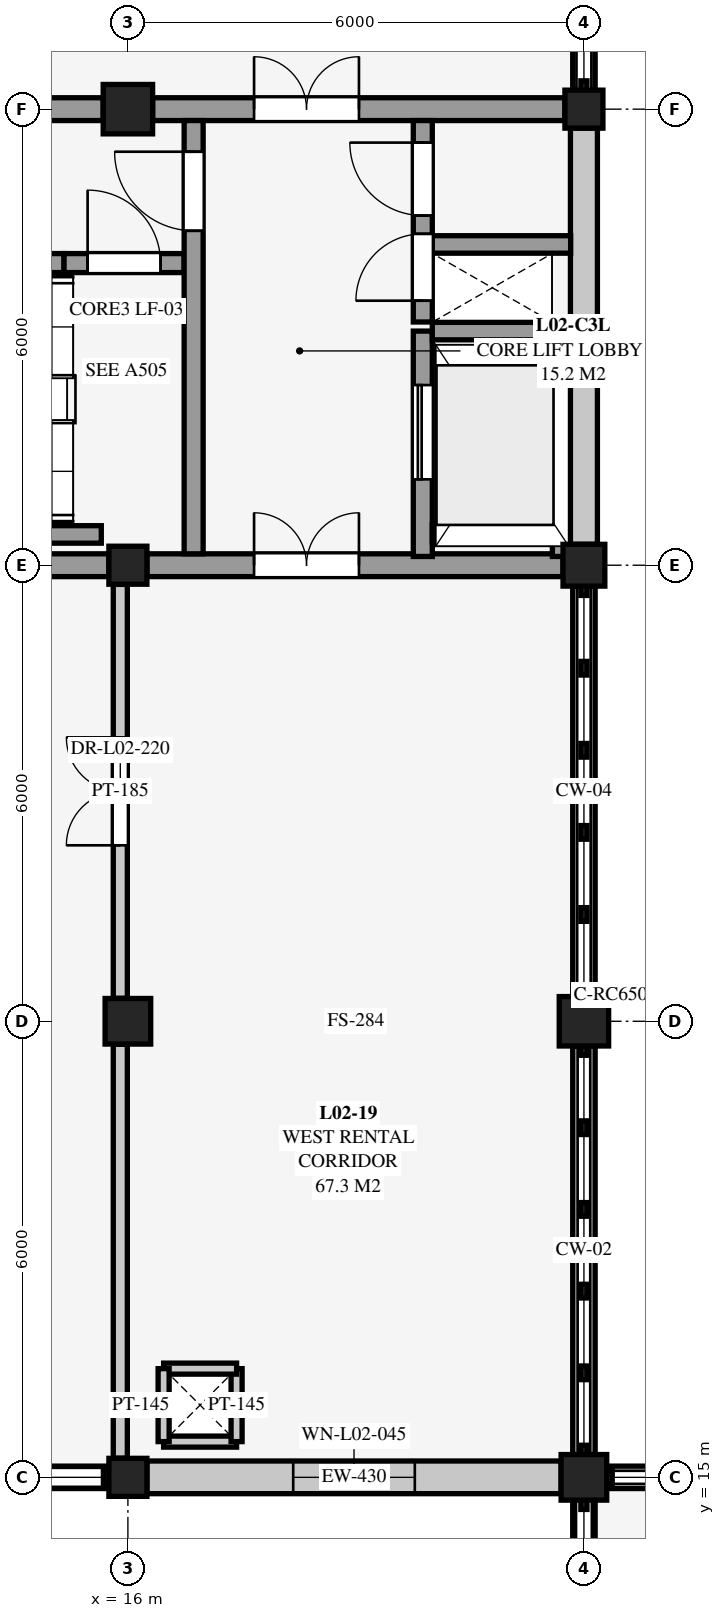
"""IFC4 building model, lengths in metres.
Left out: names, types, materials, properties, quantities, classifications, styles, units other than length and angle.
Written with IfcOpenShell. Run it as: python <this file> out.ifc"""

import sys

from ifc_helpers import new_model, si_unit, direction, frame, frame_2d, origin, origin_2d, place, context, subcontext, project, spatial, rectangle, extrude, element, fill, save


model = new_model("IFC4")
c1 = context("Model", 3, precision=1e-05, world=origin(), true_north=direction((0.0, 1.0)))
c2 = subcontext(c1, "Body", "Model", "MODEL_VIEW")
j1 = project(units=[si_unit("LENGTHUNIT", "METRE"), si_unit("PLANEANGLEUNIT", "RADIAN")], contexts=[c1])
p1 = place(None, origin())
s1 = spatial("IfcSite", under=j1, at=p1, CompositionType="ELEMENT")
p2 = place(p1, origin())
s2 = spatial("IfcBuilding", under=s1, at=p2, CompositionType="ELEMENT")
p3 = place(p2, frame((0.0, 0.0, 4.5)))
s3 = spatial("IfcBuildingStorey", under=s2, at=p3, CompositionType="ELEMENT", Elevation=4.5)
p4 = place(p3, frame((16.0, 15.0, 0.0), z_axis=(0.0, 0.0, 1.0), x_axis=(1.0, 0.0, 0.0)))
e1 = element("IfcColumn", 1, at=p4, inside=s3, PredefinedType="COLUMN", context=c2, shape_type="SweptSolid", body=[
    extrude(rectangle(XDim=0.5, YDim=0.5, at=origin_2d()), origin(), (0.0, 0.0, 1.0), 4.5),
])
p5 = place(p3, frame((16.0, 21.0, 0.0), z_axis=(0.0, 0.0, 1.0), x_axis=(1.0, 0.0, 0.0)))
e2 = element("IfcColumn", 2, at=p5, inside=s3, PredefinedType="COLUMN", context=c2, shape_type="SweptSolid", body=[
    extrude(rectangle(XDim=0.6, YDim=0.6, at=origin_2d()), origin(), (0.0, 0.0, 1.0), 4.5),
])
p6 = place(p3, frame((16.0, 27.0, 0.0), z_axis=(0.0, 0.0, 1.0), x_axis=(1.0, 0.0, 0.0)))
e3 = element("IfcColumn", 3, at=p6, inside=s3, PredefinedType="COLUMN", context=c2, shape_type="SweptSolid", body=[
    extrude(rectangle(XDim=0.5, YDim=0.5, at=origin_2d()), origin(), (0.0, 0.0, 1.0), 4.5),
])
p7 = place(p3, frame((16.0, 33.0, 0.0), z_axis=(0.0, 0.0, 1.0), x_axis=(1.0, 0.0, 0.0)))
e4 = element("IfcColumn", 4, at=p7, inside=s3, PredefinedType="COLUMN", context=c2, shape_type="SweptSolid", body=[
    extrude(rectangle(XDim=0.65, YDim=0.65, at=origin_2d()), origin(), (0.0, 0.0, 1.0), 4.5),
])
p8 = place(p3, frame((22.0, 15.0, 0.0), z_axis=(0.0, 0.0, 1.0), x_axis=(1.0, 0.0, 0.0)))
e5 = element("IfcColumn", 5, at=p8, inside=s3, PredefinedType="COLUMN", context=c2, shape_type="SweptSolid", body=[
    extrude(rectangle(XDim=0.6, YDim=0.6, at=origin_2d()), origin(), (0.0, 0.0, 1.0), 4.5),
])
p9 = place(p3, frame((22.0, 21.0, 0.0), z_axis=(0.0, 0.0, 1.0), x_axis=(1.0, 0.0, 0.0)))
e6 = element("IfcColumn", 6, at=p9, inside=s3, PredefinedType="COLUMN", context=c2, shape_type="SweptSolid", body=[
    extrude(rectangle(XDim=0.65, YDim=0.65, at=origin_2d()), origin(), (0.0, 0.0, 1.0), 4.5),
])
p10 = place(p3, frame((22.0, 27.0, 0.0), z_axis=(0.0, 0.0, 1.0), x_axis=(1.0, 0.0, 0.0)))
e7 = element("IfcColumn", 7, at=p10, inside=s3, PredefinedType="COLUMN", context=c2, shape_type="SweptSolid", body=[
    extrude(rectangle(XDim=0.55, YDim=0.55, at=origin_2d()), origin(), (0.0, 0.0, 1.0), 4.5),
])
p11 = place(p3, frame((22.0, 33.0, 0.0), z_axis=(0.0, 0.0, 1.0), x_axis=(1.0, 0.0, 0.0)))
e8 = element("IfcColumn", 8, at=p11, inside=s3, PredefinedType="COLUMN", context=c2, shape_type="SweptSolid", body=[
    extrude(rectangle(XDim=0.5, YDim=0.5, at=origin_2d()), origin(), (0.0, 0.0, 1.0), 4.5),
])
p12 = place(p3, frame((22.3, 15.0, 0.0), z_axis=(0.0, 0.0, 1.0), x_axis=(1.0, 0.0, 0.0)))
e9 = element("IfcWall", 9, at=p12, inside=s3, PredefinedType="SOLIDWALL", context=c2, shape_type="SweptSolid", body=[
    extrude(rectangle(XDim=5.425, YDim=0.295, at=frame_2d((2.712, 0.0))), origin(), (0.0, 0.0, 1.0), 0.26),
])
p13 = place(p3, frame((22.0, 9.775, 0.0), z_axis=(0.0, 0.0, 1.0), x_axis=(0.0, 1.0, 0.0)))
e10 = element("IfcWall", 10, at=p13, inside=s3, PredefinedType="SOLIDWALL", context=c2, shape_type="SweptSolid", body=[
    extrude(rectangle(XDim=4.925, YDim=0.295, at=frame_2d((2.462, 0.0))), origin(), (0.0, 0.0, 1.0), 0.16),
])
p14 = place(p3, frame((15.75, 15.0, 0.0), z_axis=(0.0, 0.0, 1.0), x_axis=(-1.0, 0.0, 0.0)))
e11 = element("IfcWall", 11, at=p14, inside=s3, PredefinedType="SOLIDWALL", context=c2, shape_type="SweptSolid", body=[
    extrude(rectangle(XDim=5.5, YDim=0.295, at=frame_2d((2.75, 0.0))), origin(), (0.0, 0.0, 1.0), 0.52),
])
p15 = place(p3, frame((21.7, 15.0, 0.0), z_axis=(0.0, 0.0, 1.0), x_axis=(-1.0, 0.0, 0.0)))
e12 = element("IfcWall", 12, at=p15, inside=s3, PredefinedType="SOLIDWALL", context=c2, shape_type="SweptSolid", body=[
    extrude(rectangle(XDim=5.45, YDim=0.43, at=frame_2d((2.725, 0.0))), origin(), (0.0, 0.0, 1.0), 3.809),
])
p16 = place(p15, frame((1.925, 0.0, 1.25)))
e13 = element("IfcOpeningElement", 13, at=p16, cuts=e12, PredefinedType="OPENING", context=c2, shape_type="SweptSolid", body=[
    extrude(rectangle(XDim=1.6, YDim=1.5, at=frame_2d((0.8, 0.75))), frame((0.0, 0.225, 0.0), z_axis=(0.0, -1.0, 0.0), x_axis=(1.0, 0.0, 0.0)), (0.0, 0.0, 1.0), 0.45),
])
p17 = place(p3, frame((22.0, 20.675, 0.0), z_axis=(0.0, 0.0, 1.0), x_axis=(0.0, -1.0, 0.0)))
e14 = element("IfcWall", 14, at=p17, inside=s3, PredefinedType="SOLIDWALL", context=c2, shape_type="SweptSolid", body=[
    extrude(rectangle(XDim=5.375, YDim=0.295, at=frame_2d((2.688, 0.0))), origin(), (0.0, 0.0, 1.0), 0.21),
])
p18 = place(p3, frame((22.0, 26.725, 0.0), z_axis=(0.0, 0.0, 1.0), x_axis=(0.0, -1.0, 0.0)))
e15 = element("IfcWall", 15, at=p18, inside=s3, PredefinedType="SOLIDWALL", context=c2, shape_type="SweptSolid", body=[
    extrude(rectangle(XDim=5.4, YDim=0.295, at=frame_2d((2.7, 0.0))), origin(), (0.0, 0.0, 1.0), 0.31),
])
p19 = place(p3, frame((22.0, 32.75, 0.0), z_axis=(0.0, 0.0, 1.0), x_axis=(0.0, -1.0, 0.0)))
e16 = element("IfcWall", 16, at=p19, inside=s3, PredefinedType="SOLIDWALL", context=c2, shape_type="SweptSolid", body=[
    extrude(rectangle(XDim=5.475, YDim=0.355, at=frame_2d((2.738, 0.0))), origin(), (0.0, 0.0, 1.0), 3.778),
])
p20 = place(p3, frame((22.0, 38.675, 0.0), z_axis=(0.0, 0.0, 1.0), x_axis=(0.0, -1.0, 0.0)))
e17 = element("IfcWall", 17, at=p20, inside=s3, PredefinedType="SOLIDWALL", context=c2, shape_type="SweptSolid", body=[
    extrude(rectangle(XDim=5.425, YDim=0.295, at=frame_2d((2.712, 0.0))), origin(), (0.0, 0.0, 1.0), 0.46),
])
for number, where, z_axis, x_axis in (
    (18, (16.47, 15.47, 0.0), (0.0, 0.0, 1.0), (1.0, 0.0, 0.0)),
    (19, (17.43, 15.47, 0.0), (0.0, 0.0, 1.0), (0.0, 1.0, 0.0)),
    (20, (17.43, 16.43, 0.0), (0.0, 0.0, 1.0), (-1.0, 0.0, 0.0)),
    (21, (16.47, 16.43, 0.0), (0.0, 0.0, 1.0), (0.0, -1.0, 0.0)),
):
    element("IfcWall", number, at=place(p3, frame(where, z_axis=z_axis, x_axis=x_axis)), inside=s3, PredefinedType="PARTITIONING", context=c2, shape_type="SweptSolid", body=[
        extrude(rectangle(XDim=0.96, YDim=0.145, at=frame_2d((0.48, 0.0))), origin(), (0.0, 0.0, 1.0), 4.24),
    ])
p21 = place(p3, frame((10.25, 27.0, 0.0), z_axis=(0.0, 0.0, 1.0), x_axis=(1.0, 0.0, 0.0)))
e22 = element("IfcWall", 22, at=p21, inside=s3, PredefinedType="SHEAR", context=c2, shape_type="SweptSolid", body=[
    extrude(rectangle(XDim=5.5, YDim=0.3, at=frame_2d((2.75, 0.0))), origin(), (0.0, 0.0, 1.0), 4.185),
])
p22 = place(p3, frame((16.25, 27.0, 0.0), z_axis=(0.0, 0.0, 1.0), x_axis=(1.0, 0.0, 0.0)))
e23 = element("IfcWall", 23, at=p22, inside=s3, PredefinedType="SHEAR", context=c2, shape_type="SweptSolid", body=[
    extrude(rectangle(XDim=5.475, YDim=0.3, at=frame_2d((2.738, 0.0))), origin(), (0.0, 0.0, 1.0), 4.185),
])
p23 = place(p22, frame((1.41, 0.0, 0.0)))
e24 = element("IfcOpeningElement", 24, at=p23, cuts=e23, PredefinedType="OPENING", context=c2, shape_type="SweptSolid", body=[
    extrude(rectangle(XDim=1.38, YDim=2.16, at=frame_2d((0.69, 1.08))), frame((0.0, 0.16, 0.0), z_axis=(0.0, -1.0, 0.0), x_axis=(1.0, 0.0, 0.0)), (0.0, 0.0, 1.0), 0.32),
])
p24 = place(p3, frame((10.325, 33.0, 0.0), z_axis=(0.0, 0.0, 1.0), x_axis=(1.0, 0.0, 0.0)))
e25 = element("IfcWall", 25, at=p24, inside=s3, PredefinedType="SHEAR", context=c2, shape_type="SweptSolid", body=[
    extrude(rectangle(XDim=5.35, YDim=0.3, at=frame_2d((2.675, 0.0))), origin(), (0.0, 0.0, 1.0), 4.185),
])
p25 = place(p24, frame((3.305, 0.0, 0.0)))
e26 = element("IfcOpeningElement", 26, at=p25, cuts=e25, PredefinedType="OPENING", context=c2, shape_type="SweptSolid", body=[
    extrude(rectangle(XDim=1.04, YDim=2.14, at=frame_2d((0.52, 1.07))), frame((0.0, 0.16, 0.0), z_axis=(0.0, -1.0, 0.0), x_axis=(1.0, 0.0, 0.0)), (0.0, 0.0, 1.0), 0.32),
])
p26 = place(p3, frame((16.325, 33.0, 0.0), z_axis=(0.0, 0.0, 1.0), x_axis=(1.0, 0.0, 0.0)))
e27 = element("IfcWall", 27, at=p26, inside=s3, PredefinedType="SHEAR", context=c2, shape_type="SweptSolid", body=[
    extrude(rectangle(XDim=5.425, YDim=0.3, at=frame_2d((2.712, 0.0))), origin(), (0.0, 0.0, 1.0), 4.185),
])
p27 = place(p26, frame((1.335, 0.0, 0.0)))
e28 = element("IfcOpeningElement", 28, at=p27, cuts=e27, PredefinedType="OPENING", context=c2, shape_type="SweptSolid", body=[
    extrude(rectangle(XDim=1.38, YDim=2.16, at=frame_2d((0.69, 1.08))), frame((0.0, 0.16, 0.0), z_axis=(0.0, -1.0, 0.0), x_axis=(1.0, 0.0, 0.0)), (0.0, 0.0, 1.0), 0.32),
])
p28 = place(p3, frame((10.52, 27.405, 0.0), z_axis=(0.0, 0.0, 1.0), x_axis=(1.0, 0.0, 0.0)))
e29 = element("IfcWall", 29, at=p28, inside=s3, PredefinedType="SHEAR", context=c2, shape_type="SweptSolid", body=[
    extrude(rectangle(XDim=5.13, YDim=0.23, at=frame_2d((2.565, 0.0))), origin(), (0.0, 0.0, 1.0), 4.5),
])
p29 = place(p3, frame((10.29, 30.975, 0.0), z_axis=(0.0, 0.0, 1.0), x_axis=(1.0, 0.0, 0.0)))
e30 = element("IfcWall", 30, at=p29, inside=s3, PredefinedType="SHEAR", context=c2, shape_type="SweptSolid", body=[
    extrude(rectangle(XDim=4.87, YDim=0.25, at=frame_2d((2.435, 0.0))), origin(), (0.0, 0.0, 1.0), 4.5),
])
p30 = place(p3, frame((15.16, 30.975, 0.0), z_axis=(0.0, 0.0, 1.0), x_axis=(1.0, 0.0, 0.0)))
e31 = element("IfcWall", 31, at=p30, inside=s3, PredefinedType="SHEAR", context=c2, shape_type="SweptSolid", body=[
    extrude(rectangle(XDim=1.58, YDim=0.25, at=frame_2d((0.79, 0.0))), origin(), (0.0, 0.0, 1.0), 4.185),
])
p31 = place(p30, frame((0.31, 0.0, 0.0)))
e32 = element("IfcOpeningElement", 32, at=p31, cuts=e31, PredefinedType="OPENING", context=c2, shape_type="SweptSolid", body=[
    extrude(rectangle(XDim=0.96, YDim=2.12, at=frame_2d((0.48, 1.06))), frame((0.0, 0.135, 0.0), z_axis=(0.0, -1.0, 0.0), x_axis=(1.0, 0.0, 0.0)), (0.0, 0.0, 1.0), 0.27),
])
p32 = place(p3, frame((16.865, 27.15, 0.0), z_axis=(0.0, 0.0, 1.0), x_axis=(0.0, 1.0, 0.0)))
e33 = element("IfcWall", 33, at=p32, inside=s3, PredefinedType="SHEAR", context=c2, shape_type="SweptSolid", body=[
    extrude(rectangle(XDim=5.7, YDim=0.25, at=frame_2d((2.85, 0.0))), origin(), (0.0, 0.0, 1.0), 4.185),
])
p33 = place(p32, frame((4.25, 0.0, 0.0)))
e34 = element("IfcOpeningElement", 34, at=p33, cuts=e33, PredefinedType="OPENING", context=c2, shape_type="SweptSolid", body=[
    extrude(rectangle(XDim=1.04, YDim=2.14, at=frame_2d((0.52, 1.07))), frame((0.0, 0.135, 0.0), z_axis=(0.0, -1.0, 0.0), x_axis=(1.0, 0.0, 0.0)), (0.0, 0.0, 1.0), 0.27),
])
p34 = place(p3, frame((19.88, 27.115, 0.0), z_axis=(0.0, 0.0, 1.0), x_axis=(0.0, 1.0, 0.0)))
e35 = element("IfcWall", 35, at=p34, inside=s3, PredefinedType="SHEAR", context=c2, shape_type="SweptSolid", body=[
    extrude(rectangle(XDim=2.965, YDim=0.25, at=frame_2d((1.482, 0.0))), origin(), (0.0, 0.0, 1.0), 4.5),
])
p35 = place(p34, frame((1.015, 0.0, 0.0)))
e36 = element("IfcOpeningElement", 36, at=p35, cuts=e35, PredefinedType="OPENING", context=c2, shape_type="SweptSolid", body=[
    extrude(rectangle(XDim=1.24, YDim=2.2, at=frame_2d((0.62, 1.1))), frame((0.0, 0.135, 0.0), z_axis=(0.0, -1.0, 0.0), x_axis=(1.0, 0.0, 0.0)), (0.0, 0.0, 1.0), 0.27),
])
p36 = place(p3, frame((20.005, 27.42, 0.0), z_axis=(0.0, 0.0, 1.0), x_axis=(1.0, 0.0, 0.0)))
e37 = element("IfcWall", 37, at=p36, inside=s3, PredefinedType="SHEAR", context=c2, shape_type="SweptSolid", body=[
    extrude(rectangle(XDim=1.58, YDim=0.23, at=frame_2d((0.79, 0.0))), origin(), (0.0, 0.0, 1.0), 4.5),
])
p37 = place(p3, frame((21.7, 27.115, 0.0), z_axis=(0.0, 0.0, 1.0), x_axis=(0.0, 1.0, 0.0)))
e38 = element("IfcWall", 38, at=p37, inside=s3, PredefinedType="SHEAR", context=c2, shape_type="SweptSolid", body=[
    extrude(rectangle(XDim=2.965, YDim=0.23, at=frame_2d((1.482, 0.0))), origin(), (0.0, 0.0, 1.0), 4.5),
])
p38 = place(p3, frame((20.005, 30.08, 0.0), z_axis=(0.0, 0.0, 1.0), x_axis=(1.0, 0.0, 0.0)))
e39 = element("IfcWall", 39, at=p38, inside=s3, PredefinedType="SHEAR", context=c2, shape_type="SweptSolid", body=[
    extrude(rectangle(XDim=1.58, YDim=0.23, at=frame_2d((0.79, 0.0))), origin(), (0.0, 0.0, 1.0), 4.5),
])
p39 = place(p3, frame((19.88, 30.2, 0.0), z_axis=(0.0, 0.0, 1.0), x_axis=(0.0, 1.0, 0.0)))
e40 = element("IfcWall", 40, at=p39, inside=s3, PredefinedType="SHEAR", context=c2, shape_type="SweptSolid", body=[
    extrude(rectangle(XDim=2.65, YDim=0.25, at=frame_2d((1.325, 0.0))), origin(), (0.0, 0.0, 1.0), 4.185),
])
p40 = place(p39, frame((0.28, 0.0, 0.0)))
e41 = element("IfcOpeningElement", 41, at=p40, cuts=e40, PredefinedType="OPENING", context=c2, shape_type="SweptSolid", body=[
    extrude(rectangle(XDim=0.88, YDim=2.08, at=frame_2d((0.44, 1.04))), frame((0.0, 0.135, 0.0), z_axis=(0.0, -1.0, 0.0), x_axis=(1.0, 0.0, 0.0)), (0.0, 0.0, 1.0), 0.27),
])
p41 = place(p39, frame((1.4, 0.0, 0.0)))
e42 = element("IfcOpeningElement", 42, at=p41, cuts=e40, PredefinedType="OPENING", context=c2, shape_type="SweptSolid", body=[
    extrude(rectangle(XDim=0.96, YDim=2.12, at=frame_2d((0.48, 1.06))), frame((0.0, 0.135, 0.0), z_axis=(0.0, -1.0, 0.0), x_axis=(1.0, 0.0, 0.0)), (0.0, 0.0, 1.0), 0.27),
])
p42 = place(p3, frame((20.005, 31.22, 0.0), z_axis=(0.0, 0.0, 1.0), x_axis=(1.0, 0.0, 0.0)))
e43 = element("IfcWall", 43, at=p42, inside=s3, PredefinedType="SHEAR", context=c2, shape_type="SweptSolid", body=[
    extrude(rectangle(XDim=1.82, YDim=0.23, at=frame_2d((0.91, 0.0))), origin(), (0.0, 0.0, 1.0), 4.185),
])
p43 = place(p3, frame((15.9, 21.302, 0.0), z_axis=(0.0, 0.0, 1.0), x_axis=(0.0, 1.0, 0.0)))
e44 = element("IfcWall", 44, at=p43, inside=s3, PredefinedType="PARTITIONING", context=c2, shape_type="SweptSolid", body=[
    extrude(rectangle(XDim=5.446, YDim=0.185, at=frame_2d((2.723, 0.0))), origin(), (0.0, 0.0, 1.0), 3.831),
])
p44 = place(p43, frame((2.013, 0.0, 0.0)))
e45 = element("IfcOpeningElement", 45, at=p44, cuts=e44, PredefinedType="OPENING", context=c2, shape_type="SweptSolid", body=[
    extrude(rectangle(XDim=1.42, YDim=2.24, at=frame_2d((0.71, 1.12))), frame((0.0, 0.103, 0.0), z_axis=(0.0, -1.0, 0.0), x_axis=(1.0, 0.0, 0.0)), (0.0, 0.0, 1.0), 0.205),
])
p45 = place(p3, frame((15.9, 15.252, 0.0), z_axis=(0.0, 0.0, 1.0), x_axis=(0.0, 1.0, 0.0)))
e46 = element("IfcWall", 46, at=p45, inside=s3, PredefinedType="PARTITIONING", context=c2, shape_type="SweptSolid", body=[
    extrude(rectangle(XDim=5.446, YDim=0.185, at=frame_2d((2.723, 0.0))), origin(), (0.0, 0.0, 1.0), 4.24),
])
p46 = place(p16, origin())
e47 = element("IfcWindow", 47, at=p46, inside=s3, PartitioningType="SINGLE_PANEL", PredefinedType="WINDOW", context=c2, shape_type="SweptSolid", body=[
    extrude(rectangle(XDim=1.6, YDim=1.5, at=frame_2d((0.8, 0.75))), frame((0.0, 0.03, 0.0), z_axis=(0.0, -1.0, 0.0), x_axis=(1.0, 0.0, 0.0)), (0.0, 0.0, 1.0), 0.06),
])
fill(e13, e47)
p47 = place(p23, origin())
e48 = element("IfcDoor", 48, at=p47, inside=s3, OperationType="DOUBLE_DOOR_SINGLE_SWING", PredefinedType="DOOR", context=c2, shape_type="SweptSolid", body=[
    extrude(rectangle(XDim=1.38, YDim=2.16, at=frame_2d((0.69, 1.08))), frame((0.0, 0.025, 0.0), z_axis=(0.0, -1.0, 0.0), x_axis=(1.0, 0.0, 0.0)), (0.0, 0.0, 1.0), 0.05),
])
fill(e24, e48)
p48 = place(p27, origin())
e49 = element("IfcDoor", 49, at=p48, inside=s3, OperationType="DOUBLE_DOOR_SINGLE_SWING", PredefinedType="DOOR", context=c2, shape_type="SweptSolid", body=[
    extrude(rectangle(XDim=1.38, YDim=2.16, at=frame_2d((0.69, 1.08))), frame((0.0, 0.025, 0.0), z_axis=(0.0, -1.0, 0.0), x_axis=(1.0, 0.0, 0.0)), (0.0, 0.0, 1.0), 0.05),
])
fill(e28, e49)
p49 = place(p31, origin())
e50 = element("IfcDoor", 50, at=p49, inside=s3, OperationType="SINGLE_SWING_LEFT", PredefinedType="DOOR", context=c2, shape_type="SweptSolid", body=[
    extrude(rectangle(XDim=0.96, YDim=2.12, at=frame_2d((0.48, 1.06))), frame((0.0, 0.025, 0.0), z_axis=(0.0, -1.0, 0.0), x_axis=(1.0, 0.0, 0.0)), (0.0, 0.0, 1.0), 0.05),
])
fill(e32, e50)
p50 = place(p33, origin())
e51 = element("IfcDoor", 51, at=p50, inside=s3, OperationType="SINGLE_SWING_RIGHT", PredefinedType="DOOR", context=c2, shape_type="SweptSolid", body=[
    extrude(rectangle(XDim=1.04, YDim=2.14, at=frame_2d((0.52, 1.07))), frame((0.0, 0.025, 0.0), z_axis=(0.0, -1.0, 0.0), x_axis=(1.0, 0.0, 0.0)), (0.0, 0.0, 1.0), 0.05),
])
fill(e34, e51)
p51 = place(p35, origin())
e52 = element("IfcDoor", 52, at=p51, inside=s3, OperationType="SLIDING_TO_LEFT", PredefinedType="DOOR", context=c2, shape_type="SweptSolid", body=[
    extrude(rectangle(XDim=1.24, YDim=2.2, at=frame_2d((0.62, 1.1))), frame((0.0, 0.025, 0.0), z_axis=(0.0, -1.0, 0.0), x_axis=(1.0, 0.0, 0.0)), (0.0, 0.0, 1.0), 0.05),
])
fill(e36, e52)
p52 = place(p40, origin())
e53 = element("IfcDoor", 53, at=p52, inside=s3, OperationType="SINGLE_SWING_LEFT", PredefinedType="DOOR", context=c2, shape_type="SweptSolid", body=[
    extrude(rectangle(XDim=0.88, YDim=2.08, at=frame_2d((0.44, 1.04))), frame((0.0, 0.025, 0.0), z_axis=(0.0, -1.0, 0.0), x_axis=(1.0, 0.0, 0.0)), (0.0, 0.0, 1.0), 0.05),
])
fill(e41, e53)
p53 = place(p41, origin())
e54 = element("IfcDoor", 54, at=p53, inside=s3, OperationType="SINGLE_SWING_RIGHT", PredefinedType="DOOR", context=c2, shape_type="SweptSolid", body=[
    extrude(rectangle(XDim=0.96, YDim=2.12, at=frame_2d((0.48, 1.06))), frame((0.0, 0.025, 0.0), z_axis=(0.0, -1.0, 0.0), x_axis=(1.0, 0.0, 0.0)), (0.0, 0.0, 1.0), 0.05),
])
fill(e42, e54)
p54 = place(p44, origin())
e55 = element("IfcDoor", 55, at=p54, inside=s3, OperationType="DOUBLE_DOOR_SINGLE_SWING", PredefinedType="DOOR", context=c2, shape_type="SweptSolid", body=[
    extrude(rectangle(XDim=1.42, YDim=2.24, at=frame_2d((0.71, 1.12))), frame((0.0, 0.025, 0.0), z_axis=(0.0, -1.0, 0.0), x_axis=(1.0, 0.0, 0.0)), (0.0, 0.0, 1.0), 0.05),
])
fill(e45, e55)
save(model, sys.argv[1])
